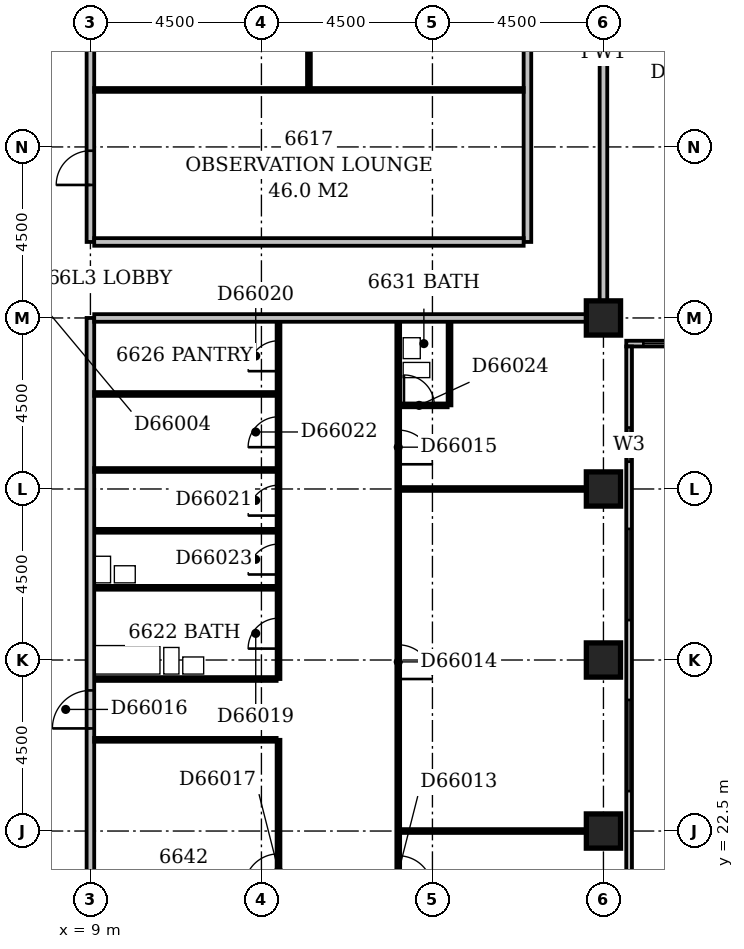
"""IFC4 building model, lengths in metres.
Left out: names, types, materials, properties, quantities, classifications, styles, units other than length and angle.
Written with IfcOpenShell. Run it as: python <this file> out.ifc"""

import sys

from ifc_helpers import new_model, si_unit, direction, frame, frame_2d, origin, origin_2d, place, context, subcontext, project, spatial, rectangle, extrude, element, fill, save


model = new_model("IFC4")
c1 = context("Model", 3, precision=1e-05, world=origin(), true_north=direction((0.0, 1.0)))
c2 = subcontext(c1, "Body", "Model", "MODEL_VIEW")
j1 = project(units=[si_unit("LENGTHUNIT", "METRE"), si_unit("PLANEANGLEUNIT", "RADIAN")], contexts=[c1])
p1 = place(None, origin())
s1 = spatial("IfcSite", under=j1, at=p1, CompositionType="ELEMENT")
p2 = place(p1, origin())
s2 = spatial("IfcBuilding", under=s1, at=p2, CompositionType="ELEMENT")
p3 = place(p2, frame((0.0, 0.0, 254.6)))
s3 = spatial("IfcBuildingStorey", under=s2, at=p3, CompositionType="ELEMENT", Elevation=254.6)
for number, where, z_axis, x_axis in (
    (1, (22.5, 22.5, -0.3), (0.0, 0.0, 1.0), (1.0, 0.0, 0.0)),
    (2, (22.5, 27.0, -0.3), (0.0, 0.0, 1.0), (1.0, 0.0, 0.0)),
    (3, (22.5, 31.5, -0.3), (0.0, 0.0, 1.0), (1.0, 0.0, 0.0)),
    (4, (22.5, 36.0, -0.3), (0.0, 0.0, 1.0), (1.0, 0.0, 0.0)),
):
    element("IfcColumn", number, at=place(p3, frame(where, z_axis=z_axis, x_axis=x_axis)), inside=s3, PredefinedType="COLUMN", context=c2, shape_type="SweptSolid", body=[
        extrude(rectangle(XDim=0.9, YDim=0.9, at=origin_2d()), origin(), (0.0, 0.0, 1.0), 3.45),
    ])
p4 = place(p3, frame((23.175, 17.4, 0.0), z_axis=(0.0, 0.0, 1.0), x_axis=(0.0, 1.0, 0.0)))
e5 = element("IfcWall", 5, at=p4, inside=s3, PredefinedType="STANDARD", context=c2, shape_type="SweptSolid", body=[
    extrude(rectangle(XDim=17.85, YDim=0.15, at=frame_2d((8.925, 0.0))), origin(), (0.0, 0.0, 1.0), 2.7),
])
p5 = place(p4, frame((1.65, 0.0, 0.6)))
e6 = element("IfcOpeningElement", 6, at=p5, cuts=e5, PredefinedType="OPENING", context=c2, shape_type="SweptSolid", body=[
    extrude(rectangle(XDim=2.4, YDim=1.8, at=frame_2d((1.2, 0.9))), frame((0.0, 0.087, 0.0), z_axis=(0.0, -1.0, 0.0), x_axis=(1.0, 0.0, 0.0)), (0.0, 0.0, 1.0), 0.174),
])
p6 = place(p4, frame((6.15, 0.0, 0.6)))
e7 = element("IfcOpeningElement", 7, at=p6, cuts=e5, PredefinedType="OPENING", context=c2, shape_type="SweptSolid", body=[
    extrude(rectangle(XDim=2.4, YDim=1.8, at=frame_2d((1.2, 0.9))), frame((0.0, 0.087, 0.0), z_axis=(0.0, -1.0, 0.0), x_axis=(1.0, 0.0, 0.0)), (0.0, 0.0, 1.0), 0.174),
])
p7 = place(p4, frame((10.65, 0.0, 0.6)))
e8 = element("IfcOpeningElement", 8, at=p7, cuts=e5, PredefinedType="OPENING", context=c2, shape_type="SweptSolid", body=[
    extrude(rectangle(XDim=2.4, YDim=1.8, at=frame_2d((1.2, 0.9))), frame((0.0, 0.087, 0.0), z_axis=(0.0, -1.0, 0.0), x_axis=(1.0, 0.0, 0.0)), (0.0, 0.0, 1.0), 0.174),
])
p8 = place(p4, frame((14.817, 0.0, 0.6)))
e9 = element("IfcOpeningElement", 9, at=p8, cuts=e5, PredefinedType="OPENING", context=c2, shape_type="SweptSolid", body=[
    extrude(rectangle(XDim=0.9, YDim=1.8, at=frame_2d((0.45, 0.9))), frame((0.0, 0.087, 0.0), z_axis=(0.0, -1.0, 0.0), x_axis=(1.0, 0.0, 0.0)), (0.0, 0.0, 1.0), 0.174),
])
p9 = place(p3, frame((23.1, 35.325, 0.0), z_axis=(0.0, 0.0, 1.0), x_axis=(1.0, 0.0, 0.0)))
e10 = element("IfcWall", 10, at=p9, inside=s3, PredefinedType="STANDARD", context=c2, shape_type="SweptSolid", body=[
    extrude(rectangle(XDim=18.15, YDim=0.15, at=frame_2d((9.075, 0.0))), origin(), (0.0, 0.0, 1.0), 2.7),
])
p10 = place(p9, frame((0.45, 0.0, 0.6)))
e11 = element("IfcOpeningElement", 11, at=p10, cuts=e10, PredefinedType="OPENING", context=c2, shape_type="SweptSolid", body=[
    extrude(rectangle(XDim=2.4, YDim=1.8, at=frame_2d((1.2, 0.9))), frame((0.0, 0.087, 0.0), z_axis=(0.0, -1.0, 0.0), x_axis=(1.0, 0.0, 0.0)), (0.0, 0.0, 1.0), 0.174),
])
p11 = place(p9, frame((4.95, 0.0, 0.6)))
e12 = element("IfcOpeningElement", 12, at=p11, cuts=e10, PredefinedType="OPENING", context=c2, shape_type="SweptSolid", body=[
    extrude(rectangle(XDim=2.4, YDim=1.8, at=frame_2d((1.2, 0.9))), frame((0.0, 0.087, 0.0), z_axis=(0.0, -1.0, 0.0), x_axis=(1.0, 0.0, 0.0)), (0.0, 0.0, 1.0), 0.174),
])
p12 = place(p9, frame((9.45, 0.0, 0.6)))
e13 = element("IfcOpeningElement", 13, at=p12, cuts=e10, PredefinedType="OPENING", context=c2, shape_type="SweptSolid", body=[
    extrude(rectangle(XDim=2.4, YDim=1.8, at=frame_2d((1.2, 0.9))), frame((0.0, 0.087, 0.0), z_axis=(0.0, -1.0, 0.0), x_axis=(1.0, 0.0, 0.0)), (0.0, 0.0, 1.0), 0.174),
])
p13 = place(p9, frame((13.646, 0.0, 0.6)))
e14 = element("IfcOpeningElement", 14, at=p13, cuts=e10, PredefinedType="OPENING", context=c2, shape_type="SweptSolid", body=[
    extrude(rectangle(XDim=1.8, YDim=1.8, at=frame_2d((0.9, 0.9))), frame((0.0, 0.087, 0.0), z_axis=(0.0, -1.0, 0.0), x_axis=(1.0, 0.0, 0.0)), (0.0, 0.0, 1.0), 0.174),
])
p14 = place(p3, frame((17.1, 17.4, 0.0), z_axis=(0.0, 0.0, 1.0), x_axis=(0.0, 1.0, 0.0)))
e15 = element("IfcWall", 15, at=p14, inside=s3, PredefinedType="PARTITIONING", context=c2, shape_type="SweptSolid", body=[
    extrude(rectangle(XDim=18.5, YDim=0.1, at=frame_2d((9.25, 0.0))), origin(), (0.0, 0.0, 1.0), 3.15),
])
p15 = place(p14, frame((3.55, 0.0, 0.0)))
e16 = element("IfcOpeningElement", 16, at=p15, cuts=e15, PredefinedType="OPENING", context=c2, shape_type="SweptSolid", body=[
    extrude(rectangle(XDim=0.9, YDim=2.1, at=frame_2d((0.45, 1.05))), frame((0.0, 0.062, 0.0), z_axis=(0.0, -1.0, 0.0), x_axis=(1.0, 0.0, 0.0)), (0.0, 0.0, 1.0), 0.124),
])
p16 = place(p14, frame((9.1, 0.0, 0.0)))
e17 = element("IfcOpeningElement", 17, at=p16, cuts=e15, PredefinedType="OPENING", context=c2, shape_type="SweptSolid", body=[
    extrude(rectangle(XDim=0.9, YDim=2.1, at=frame_2d((0.45, 1.05))), frame((0.0, 0.062, 0.0), z_axis=(0.0, -1.0, 0.0), x_axis=(1.0, 0.0, 0.0)), (0.0, 0.0, 1.0), 0.124),
])
p17 = place(p14, frame((14.75, 0.0, 0.0)))
e18 = element("IfcOpeningElement", 18, at=p17, cuts=e15, PredefinedType="OPENING", context=c2, shape_type="SweptSolid", body=[
    extrude(rectangle(XDim=0.9, YDim=2.1, at=frame_2d((0.45, 1.05))), frame((0.0, 0.062, 0.0), z_axis=(0.0, -1.0, 0.0), x_axis=(1.0, 0.0, 0.0)), (0.0, 0.0, 1.0), 0.124),
])
p18 = place(p3, frame((9.0, 18.45, 0.0), z_axis=(0.0, 0.0, 1.0), x_axis=(0.0, 1.0, 0.0)))
e19 = element("IfcWall", 19, at=p18, inside=s3, PredefinedType="PARTITIONING", context=c2, shape_type="SweptSolid", body=[
    extrude(rectangle(XDim=17.55, YDim=0.2, at=frame_2d((8.775, 0.0))), origin(), (0.0, 0.0, 1.0), 3.15),
])
p19 = place(p18, frame((6.75, 0.0, 0.0)))
e20 = element("IfcOpeningElement", 20, at=p19, cuts=e19, PredefinedType="OPENING", context=c2, shape_type="SweptSolid", body=[
    extrude(rectangle(XDim=1.0, YDim=2.1, at=frame_2d((0.5, 1.05))), frame((0.0, 0.112, 0.0), z_axis=(0.0, -1.0, 0.0), x_axis=(1.0, 0.0, 0.0)), (0.0, 0.0, 1.0), 0.224),
])
p20 = place(p3, frame((13.95, 18.45, 0.0), z_axis=(0.0, 0.0, 1.0), x_axis=(0.0, 1.0, 0.0)))
e21 = element("IfcWall", 21, at=p20, inside=s3, PredefinedType="PARTITIONING", context=c2, shape_type="SweptSolid", body=[
    extrude(rectangle(XDim=6.45, YDim=0.1, at=frame_2d((3.225, 0.0))), origin(), (0.0, 0.0, 1.0), 3.15),
])
p21 = place(p20, frame((2.55, 0.0, 0.0)))
e22 = element("IfcOpeningElement", 22, at=p21, cuts=e21, PredefinedType="OPENING", context=c2, shape_type="SweptSolid", body=[
    extrude(rectangle(XDim=0.9, YDim=2.1, at=frame_2d((0.45, 1.05))), frame((0.0, 0.062, 0.0), z_axis=(0.0, -1.0, 0.0), x_axis=(1.0, 0.0, 0.0)), (0.0, 0.0, 1.0), 0.124),
])
p22 = place(p3, frame((17.15, 22.5, 0.0), z_axis=(0.0, 0.0, 1.0), x_axis=(1.0, 0.0, 0.0)))
e23 = element("IfcWall", 23, at=p22, inside=s3, PredefinedType="PARTITIONING", context=c2, shape_type="SweptSolid", body=[
    extrude(rectangle(XDim=4.9, YDim=0.1, at=frame_2d((2.45, 0.0))), origin(), (0.0, 0.0, 1.0), 3.15),
])
p23 = place(p3, frame((9.1, 24.9, 0.0), z_axis=(0.0, 0.0, 1.0), x_axis=(1.0, 0.0, 0.0)))
e24 = element("IfcWall", 24, at=p23, inside=s3, PredefinedType="PARTITIONING", context=c2, shape_type="SweptSolid", body=[
    extrude(rectangle(XDim=4.8, YDim=0.1, at=frame_2d((2.4, 0.0))), origin(), (0.0, 0.0, 1.0), 3.15),
])
p24 = place(p3, frame((9.1, 26.5, 0.0), z_axis=(0.0, 0.0, 1.0), x_axis=(1.0, 0.0, 0.0)))
e25 = element("IfcWall", 25, at=p24, inside=s3, PredefinedType="PLUMBINGWALL", context=c2, shape_type="SweptSolid", body=[
    extrude(rectangle(XDim=4.8, YDim=0.1, at=frame_2d((2.4, 0.0))), origin(), (0.0, 0.0, 1.0), 2.55),
])
p25 = place(p3, frame((13.95, 26.5, 0.0), z_axis=(0.0, 0.0, 1.0), x_axis=(0.0, 1.0, 0.0)))
e26 = element("IfcWall", 26, at=p25, inside=s3, PredefinedType="PARTITIONING", context=c2, shape_type="SweptSolid", body=[
    extrude(rectangle(XDim=9.4, YDim=0.1, at=frame_2d((4.7, 0.0))), origin(), (0.0, 0.0, 1.0), 3.15),
])
p26 = place(p25, frame((0.8, 0.0, 0.0)))
e27 = element("IfcOpeningElement", 27, at=p26, cuts=e26, PredefinedType="OPENING", context=c2, shape_type="SweptSolid", body=[
    extrude(rectangle(XDim=0.8, YDim=2.1, at=frame_2d((0.4, 1.05))), frame((0.0, 0.062, 0.0), z_axis=(0.0, -1.0, 0.0), x_axis=(1.0, 0.0, 0.0)), (0.0, 0.0, 1.0), 0.124),
])
p27 = place(p25, frame((8.1, 0.0, 0.0)))
e28 = element("IfcOpeningElement", 28, at=p27, cuts=e26, PredefinedType="OPENING", context=c2, shape_type="SweptSolid", body=[
    extrude(rectangle(XDim=0.8, YDim=2.1, at=frame_2d((0.4, 1.05))), frame((0.0, 0.062, 0.0), z_axis=(0.0, -1.0, 0.0), x_axis=(1.0, 0.0, 0.0)), (0.0, 0.0, 1.0), 0.124),
])
p28 = place(p25, frame((4.3, 0.0, 0.0)))
e29 = element("IfcOpeningElement", 29, at=p28, cuts=e26, PredefinedType="OPENING", context=c2, shape_type="SweptSolid", body=[
    extrude(rectangle(XDim=0.8, YDim=2.1, at=frame_2d((0.4, 1.05))), frame((0.0, 0.062, 0.0), z_axis=(0.0, -1.0, 0.0), x_axis=(1.0, 0.0, 0.0)), (0.0, 0.0, 1.0), 0.124),
])
p29 = place(p25, frame((6.1, 0.0, 0.0)))
e30 = element("IfcOpeningElement", 30, at=p29, cuts=e26, PredefinedType="OPENING", context=c2, shape_type="SweptSolid", body=[
    extrude(rectangle(XDim=0.8, YDim=2.1, at=frame_2d((0.4, 1.05))), frame((0.0, 0.062, 0.0), z_axis=(0.0, -1.0, 0.0), x_axis=(1.0, 0.0, 0.0)), (0.0, 0.0, 1.0), 0.124),
])
p30 = place(p25, frame((2.75, 0.0, 0.0)))
e31 = element("IfcOpeningElement", 31, at=p30, cuts=e26, PredefinedType="OPENING", context=c2, shape_type="SweptSolid", body=[
    extrude(rectangle(XDim=0.8, YDim=2.1, at=frame_2d((0.4, 1.05))), frame((0.0, 0.062, 0.0), z_axis=(0.0, -1.0, 0.0), x_axis=(1.0, 0.0, 0.0)), (0.0, 0.0, 1.0), 0.124),
])
for number, where, z_axis, x_axis in (
    (32, (9.1, 28.9, 0.0), (0.0, 0.0, 1.0), (1.0, 0.0, 0.0)),
    (33, (9.1, 30.4, 0.0), (0.0, 0.0, 1.0), (1.0, 0.0, 0.0)),
):
    element("IfcWall", number, at=place(p3, frame(where, z_axis=z_axis, x_axis=x_axis)), inside=s3, PredefinedType="PLUMBINGWALL", context=c2, shape_type="SweptSolid", body=[
        extrude(rectangle(XDim=4.8, YDim=0.1, at=frame_2d((2.4, 0.0))), origin(), (0.0, 0.0, 1.0), 3.15),
    ])
p31 = place(p3, frame((17.15, 31.5, 0.0), z_axis=(0.0, 0.0, 1.0), x_axis=(1.0, 0.0, 0.0)))
e34 = element("IfcWall", 34, at=p31, inside=s3, PredefinedType="PARTITIONING", context=c2, shape_type="SweptSolid", body=[
    extrude(rectangle(XDim=4.9, YDim=0.1, at=frame_2d((2.45, 0.0))), origin(), (0.0, 0.0, 1.0), 3.15),
])
p32 = place(p3, frame((9.1, 32.0, 0.0), z_axis=(0.0, 0.0, 1.0), x_axis=(1.0, 0.0, 0.0)))
e35 = element("IfcWall", 35, at=p32, inside=s3, PredefinedType="PARTITIONING", context=c2, shape_type="SweptSolid", body=[
    extrude(rectangle(XDim=4.8, YDim=0.1, at=frame_2d((2.4, 0.0))), origin(), (0.0, 0.0, 1.0), 3.15),
])
p33 = place(p3, frame((17.15, 33.7, 0.0), z_axis=(0.0, 0.0, 1.0), x_axis=(1.0, 0.0, 0.0)))
e36 = element("IfcWall", 36, at=p33, inside=s3, PredefinedType="PLUMBINGWALL", context=c2, shape_type="SweptSolid", body=[
    extrude(rectangle(XDim=1.25, YDim=0.1, at=frame_2d((0.625, 0.0))), origin(), (0.0, 0.0, 1.0), 3.15),
])
p34 = place(p33, frame((0.1, 0.0, 0.0)))
e37 = element("IfcOpeningElement", 37, at=p34, cuts=e36, PredefinedType="OPENING", context=c2, shape_type="SweptSolid", body=[
    extrude(rectangle(XDim=0.8, YDim=2.1, at=frame_2d((0.4, 1.05))), frame((0.0, 0.062, 0.0), z_axis=(0.0, -1.0, 0.0), x_axis=(1.0, 0.0, 0.0)), (0.0, 0.0, 1.0), 0.124),
])
p35 = place(p3, frame((18.45, 33.7, 0.0), z_axis=(0.0, 0.0, 1.0), x_axis=(0.0, 1.0, 0.0)))
e38 = element("IfcWall", 38, at=p35, inside=s3, PredefinedType="PLUMBINGWALL", context=c2, shape_type="SweptSolid", body=[
    extrude(rectangle(XDim=2.2, YDim=0.1, at=frame_2d((1.1, 0.0))), origin(), (0.0, 0.0, 1.0), 3.15),
])
p36 = place(p3, frame((9.1, 34.0, 0.0), z_axis=(0.0, 0.0, 1.0), x_axis=(1.0, 0.0, 0.0)))
e39 = element("IfcWall", 39, at=p36, inside=s3, PredefinedType="PARTITIONING", context=c2, shape_type="SweptSolid", body=[
    extrude(rectangle(XDim=4.8, YDim=0.1, at=frame_2d((2.4, 0.0))), origin(), (0.0, 0.0, 1.0), 3.15),
])
p37 = place(p3, frame((9.1, 36.0, 0.0), z_axis=(0.0, 0.0, 1.0), x_axis=(1.0, 0.0, 0.0)))
e40 = element("IfcWall", 40, at=p37, inside=s3, PredefinedType="PARTITIONING", context=c2, shape_type="SweptSolid", body=[
    extrude(rectangle(XDim=12.95, YDim=0.2, at=frame_2d((6.475, 0.0))), origin(), (0.0, 0.0, 1.0), 3.15),
])
p38 = place(p3, frame((22.5, 36.45, 0.0), z_axis=(0.0, 0.0, 1.0), x_axis=(0.0, 1.0, 0.0)))
e41 = element("IfcWall", 41, at=p38, inside=s3, PredefinedType="PARTITIONING", context=c2, shape_type="SweptSolid", body=[
    extrude(rectangle(XDim=13.05, YDim=0.2, at=frame_2d((6.525, 0.0))), origin(), (0.0, 0.0, 1.0), 3.15),
])
p39 = place(p3, frame((9.0, 38.0, 0.0), z_axis=(0.0, 0.0, 1.0), x_axis=(0.0, 1.0, 0.0)))
e42 = element("IfcWall", 42, at=p39, inside=s3, PredefinedType="PARTITIONING", context=c2, shape_type="SweptSolid", body=[
    extrude(rectangle(XDim=11.5, YDim=0.2, at=frame_2d((5.75, 0.0))), origin(), (0.0, 0.0, 1.0), 3.15),
])
p40 = place(p39, frame((1.5, 0.0, 0.0)))
e43 = element("IfcOpeningElement", 43, at=p40, cuts=e42, PredefinedType="OPENING", context=c2, shape_type="SweptSolid", body=[
    extrude(rectangle(XDim=0.9, YDim=2.1, at=frame_2d((0.45, 1.05))), frame((0.0, 0.112, 0.0), z_axis=(0.0, -1.0, 0.0), x_axis=(1.0, 0.0, 0.0)), (0.0, 0.0, 1.0), 0.224),
])
p41 = place(p39, frame((7.25, 0.0, 0.0)))
e44 = element("IfcOpeningElement", 44, at=p41, cuts=e42, PredefinedType="OPENING", context=c2, shape_type="SweptSolid", body=[
    extrude(rectangle(XDim=0.9, YDim=2.1, at=frame_2d((0.45, 1.05))), frame((0.0, 0.112, 0.0), z_axis=(0.0, -1.0, 0.0), x_axis=(1.0, 0.0, 0.0)), (0.0, 0.0, 1.0), 0.224),
])
p42 = place(p3, frame((9.1, 38.0, 0.0), z_axis=(0.0, 0.0, 1.0), x_axis=(1.0, 0.0, 0.0)))
e45 = element("IfcWall", 45, at=p42, inside=s3, PredefinedType="PARTITIONING", context=c2, shape_type="SweptSolid", body=[
    extrude(rectangle(XDim=11.3, YDim=0.2, at=frame_2d((5.65, 0.0))), origin(), (0.0, 0.0, 1.0), 3.15),
])
p43 = place(p3, frame((20.5, 38.0, 0.0), z_axis=(0.0, 0.0, 1.0), x_axis=(0.0, 1.0, 0.0)))
e46 = element("IfcWall", 46, at=p43, inside=s3, PredefinedType="PARTITIONING", context=c2, shape_type="SweptSolid", body=[
    extrude(rectangle(XDim=11.5, YDim=0.2, at=frame_2d((5.75, 0.0))), origin(), (0.0, 0.0, 1.0), 3.15),
])
p44 = place(p3, frame((9.1, 42.0, 0.0), z_axis=(0.0, 0.0, 1.0), x_axis=(1.0, 0.0, 0.0)))
e47 = element("IfcWall", 47, at=p44, inside=s3, PredefinedType="PARTITIONING", context=c2, shape_type="SweptSolid", body=[
    extrude(rectangle(XDim=11.3, YDim=0.1, at=frame_2d((5.65, 0.0))), origin(), (0.0, 0.0, 1.0), 3.15),
])
p45 = place(p3, frame((14.75, 42.05, 0.0), z_axis=(0.0, 0.0, 1.0), x_axis=(0.0, 1.0, 0.0)))
e48 = element("IfcWall", 48, at=p45, inside=s3, PredefinedType="PARTITIONING", context=c2, shape_type="SweptSolid", body=[
    extrude(rectangle(XDim=7.35, YDim=0.1, at=frame_2d((3.675, 0.0))), origin(), (0.0, 0.0, 1.0), 3.15),
])
p46 = place(p6, origin())
e49 = element("IfcWindow", 49, at=p46, inside=s3, PartitioningType="SINGLE_PANEL", PredefinedType="WINDOW", context=c2, shape_type="SweptSolid", body=[
    extrude(rectangle(XDim=2.4, YDim=1.8, at=frame_2d((1.2, 0.9))), frame((0.0, 0.03, 0.0), z_axis=(0.0, -1.0, 0.0), x_axis=(1.0, 0.0, 0.0)), (0.0, 0.0, 1.0), 0.06),
])
fill(e7, e49)
p47 = place(p7, origin())
e50 = element("IfcWindow", 50, at=p47, inside=s3, PartitioningType="SINGLE_PANEL", PredefinedType="WINDOW", context=c2, shape_type="SweptSolid", body=[
    extrude(rectangle(XDim=2.4, YDim=1.8, at=frame_2d((1.2, 0.9))), frame((0.0, 0.03, 0.0), z_axis=(0.0, -1.0, 0.0), x_axis=(1.0, 0.0, 0.0)), (0.0, 0.0, 1.0), 0.06),
])
fill(e8, e50)
p48 = place(p8, origin())
e51 = element("IfcWindow", 51, at=p48, inside=s3, PartitioningType="SINGLE_PANEL", PredefinedType="WINDOW", context=c2, shape_type="SweptSolid", body=[
    extrude(rectangle(XDim=0.9, YDim=1.8, at=frame_2d((0.45, 0.9))), frame((0.0, 0.03, 0.0), z_axis=(0.0, -1.0, 0.0), x_axis=(1.0, 0.0, 0.0)), (0.0, 0.0, 1.0), 0.06),
])
fill(e9, e51)
p49 = place(p10, origin())
e52 = element("IfcWindow", 52, at=p49, inside=s3, PartitioningType="SINGLE_PANEL", PredefinedType="WINDOW", context=c2, shape_type="SweptSolid", body=[
    extrude(rectangle(XDim=2.4, YDim=1.8, at=frame_2d((1.2, 0.9))), frame((0.0, 0.03, 0.0), z_axis=(0.0, -1.0, 0.0), x_axis=(1.0, 0.0, 0.0)), (0.0, 0.0, 1.0), 0.06),
])
fill(e11, e52)
p50 = place(p15, frame((0.9, 0.0, 0.0), z_axis=(0.0, 0.0, 1.0), x_axis=(-1.0, 0.0, 0.0)))
e53 = element("IfcDoor", 53, at=p50, inside=s3, OperationType="SINGLE_SWING_RIGHT", PredefinedType="DOOR", context=c2, shape_type="SweptSolid", body=[
    extrude(rectangle(XDim=0.9, YDim=2.1, at=frame_2d((0.45, 1.05))), frame((0.0, 0.025, 0.0), z_axis=(0.0, -1.0, 0.0), x_axis=(1.0, 0.0, 0.0)), (0.0, 0.0, 1.0), 0.05),
])
fill(e16, e53)
p51 = place(p16, frame((0.9, 0.0, 0.0), z_axis=(0.0, 0.0, 1.0), x_axis=(-1.0, 0.0, 0.0)))
e54 = element("IfcDoor", 54, at=p51, inside=s3, OperationType="SINGLE_SWING_RIGHT", PredefinedType="DOOR", context=c2, shape_type="SweptSolid", body=[
    extrude(rectangle(XDim=0.9, YDim=2.1, at=frame_2d((0.45, 1.05))), frame((0.0, 0.025, 0.0), z_axis=(0.0, -1.0, 0.0), x_axis=(1.0, 0.0, 0.0)), (0.0, 0.0, 1.0), 0.05),
])
fill(e17, e54)
p52 = place(p17, frame((0.9, 0.0, 0.0), z_axis=(0.0, 0.0, 1.0), x_axis=(-1.0, 0.0, 0.0)))
e55 = element("IfcDoor", 55, at=p52, inside=s3, OperationType="SINGLE_SWING_RIGHT", PredefinedType="DOOR", context=c2, shape_type="SweptSolid", body=[
    extrude(rectangle(XDim=0.9, YDim=2.1, at=frame_2d((0.45, 1.05))), frame((0.0, 0.025, 0.0), z_axis=(0.0, -1.0, 0.0), x_axis=(1.0, 0.0, 0.0)), (0.0, 0.0, 1.0), 0.05),
])
fill(e18, e55)
p53 = place(p19, origin())
e56 = element("IfcDoor", 56, at=p53, inside=s3, OperationType="SINGLE_SWING_LEFT", PredefinedType="DOOR", context=c2, shape_type="SweptSolid", body=[
    extrude(rectangle(XDim=1.0, YDim=2.1, at=frame_2d((0.5, 1.05))), frame((0.0, 0.025, 0.0), z_axis=(0.0, -1.0, 0.0), x_axis=(1.0, 0.0, 0.0)), (0.0, 0.0, 1.0), 0.05),
])
fill(e20, e56)
p54 = place(p21, origin())
e57 = element("IfcDoor", 57, at=p54, inside=s3, OperationType="SINGLE_SWING_LEFT", PredefinedType="DOOR", context=c2, shape_type="SweptSolid", body=[
    extrude(rectangle(XDim=0.9, YDim=2.1, at=frame_2d((0.45, 1.05))), frame((0.0, 0.025, 0.0), z_axis=(0.0, -1.0, 0.0), x_axis=(1.0, 0.0, 0.0)), (0.0, 0.0, 1.0), 0.05),
])
fill(e22, e57)
p55 = place(p26, origin())
e58 = element("IfcDoor", 58, at=p55, inside=s3, OperationType="SINGLE_SWING_LEFT", PredefinedType="DOOR", context=c2, shape_type="SweptSolid", body=[
    extrude(rectangle(XDim=0.8, YDim=2.1, at=frame_2d((0.4, 1.05))), frame((0.0, 0.025, 0.0), z_axis=(0.0, -1.0, 0.0), x_axis=(1.0, 0.0, 0.0)), (0.0, 0.0, 1.0), 0.05),
])
fill(e27, e58)
p56 = place(p27, origin())
e59 = element("IfcDoor", 59, at=p56, inside=s3, OperationType="SINGLE_SWING_LEFT", PredefinedType="DOOR", context=c2, shape_type="SweptSolid", body=[
    extrude(rectangle(XDim=0.8, YDim=2.1, at=frame_2d((0.4, 1.05))), frame((0.0, 0.025, 0.0), z_axis=(0.0, -1.0, 0.0), x_axis=(1.0, 0.0, 0.0)), (0.0, 0.0, 1.0), 0.05),
])
fill(e28, e59)
p57 = place(p28, origin())
e60 = element("IfcDoor", 60, at=p57, inside=s3, OperationType="SINGLE_SWING_LEFT", PredefinedType="DOOR", context=c2, shape_type="SweptSolid", body=[
    extrude(rectangle(XDim=0.8, YDim=2.1, at=frame_2d((0.4, 1.05))), frame((0.0, 0.025, 0.0), z_axis=(0.0, -1.0, 0.0), x_axis=(1.0, 0.0, 0.0)), (0.0, 0.0, 1.0), 0.05),
])
fill(e29, e60)
p58 = place(p29, origin())
e61 = element("IfcDoor", 61, at=p58, inside=s3, OperationType="SINGLE_SWING_LEFT", PredefinedType="DOOR", context=c2, shape_type="SweptSolid", body=[
    extrude(rectangle(XDim=0.8, YDim=2.1, at=frame_2d((0.4, 1.05))), frame((0.0, 0.025, 0.0), z_axis=(0.0, -1.0, 0.0), x_axis=(1.0, 0.0, 0.0)), (0.0, 0.0, 1.0), 0.05),
])
fill(e30, e61)
p59 = place(p30, origin())
e62 = element("IfcDoor", 62, at=p59, inside=s3, OperationType="SINGLE_SWING_LEFT", PredefinedType="DOOR", context=c2, shape_type="SweptSolid", body=[
    extrude(rectangle(XDim=0.8, YDim=2.1, at=frame_2d((0.4, 1.05))), frame((0.0, 0.025, 0.0), z_axis=(0.0, -1.0, 0.0), x_axis=(1.0, 0.0, 0.0)), (0.0, 0.0, 1.0), 0.05),
])
fill(e31, e62)
p60 = place(p34, origin())
e63 = element("IfcDoor", 63, at=p60, inside=s3, OperationType="SINGLE_SWING_LEFT", PredefinedType="DOOR", context=c2, shape_type="SweptSolid", body=[
    extrude(rectangle(XDim=0.8, YDim=2.1, at=frame_2d((0.4, 1.05))), frame((0.0, 0.025, 0.0), z_axis=(0.0, -1.0, 0.0), x_axis=(1.0, 0.0, 0.0)), (0.0, 0.0, 1.0), 0.05),
])
fill(e37, e63)
p61 = place(p40, origin())
e64 = element("IfcDoor", 64, at=p61, inside=s3, OperationType="SINGLE_SWING_LEFT", PredefinedType="DOOR", context=c2, shape_type="SweptSolid", body=[
    extrude(rectangle(XDim=0.9, YDim=2.1, at=frame_2d((0.45, 1.05))), frame((0.0, 0.025, 0.0), z_axis=(0.0, -1.0, 0.0), x_axis=(1.0, 0.0, 0.0)), (0.0, 0.0, 1.0), 0.05),
])
fill(e43, e64)
save(model, sys.argv[1])
